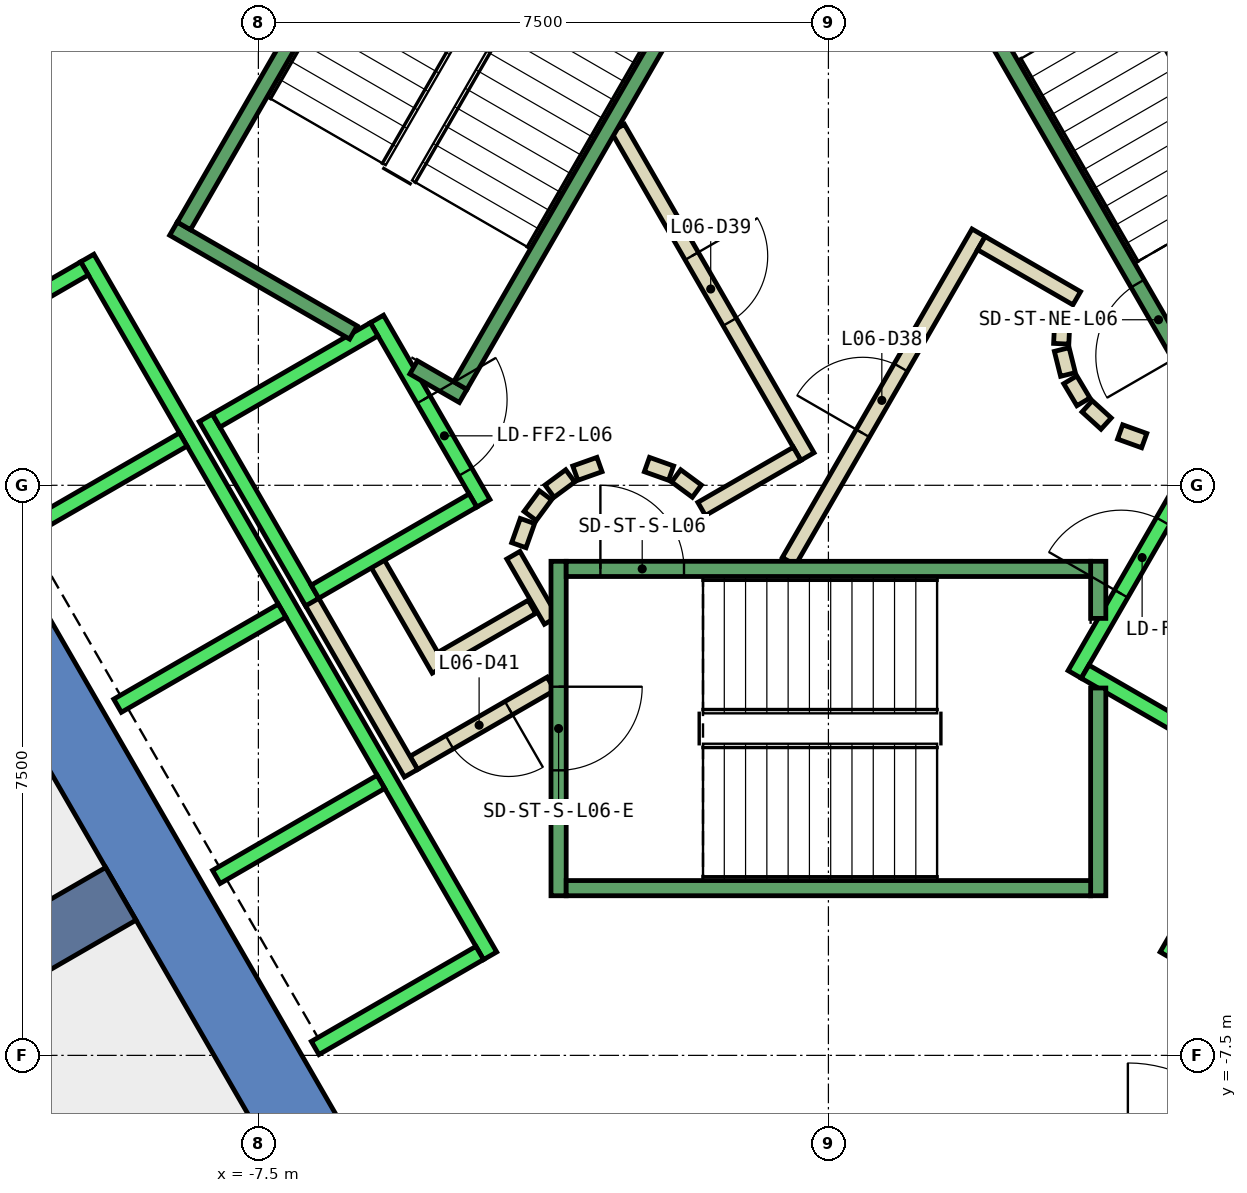
"""IFC4 building model, lengths in metres.
Left out: names, types, materials, properties, quantities, classifications, styles, units other than length and angle.
Written with IfcOpenShell. Run it as: python <this file> out.ifc"""

import sys

from ifc_helpers import new_model, si_unit, direction, frame, frame_2d, origin, place, context, subcontext, project, spatial, polyline, rectangle, outline, extrude, element, fill, save


model = new_model("IFC4")
c1 = context("Model", 3, precision=1e-05, world=origin(), true_north=direction((0.0, 1.0)))
c2 = subcontext(c1, "Body", "Model", "MODEL_VIEW")
j1 = project(units=[si_unit("LENGTHUNIT", "METRE"), si_unit("PLANEANGLEUNIT", "RADIAN")], contexts=[c1])
p1 = place(None, origin())
s1 = spatial("IfcSite", under=j1, at=p1, CompositionType="ELEMENT")
p2 = place(p1, origin())
s2 = spatial("IfcBuilding", under=s1, at=p2, CompositionType="ELEMENT")
p3 = place(p2, frame((0.0, 0.0, 35.0)))
s3 = spatial("IfcBuildingStorey", under=s2, at=p3, CompositionType="ELEMENT", Elevation=35.0)
p4 = place(p3, frame((0.0, 0.0, -0.6)))
e1 = element("IfcWall", 1, at=p4, inside=s3, PredefinedType="SHEAR", context=c2, shape_type="SweptSolid", body=[
    extrude(outline(polyline([(-12.267, 5.252), (-11.402, 4.752), (-6.351, 13.5), (-6.928, 14.5), (-12.267, 5.252)])), origin(), (0.0, 0.0, 1.0), 4.4),
])
p5 = place(p3, frame((0.0, 0.0, -0.6)))
e2 = element("IfcWall", 2, at=p5, inside=s3, PredefinedType="SHEAR", context=c2, shape_type="SweptSolid", body=[
    extrude(outline(polyline([(-13.856, 2.5), (-6.928, -9.5), (-6.351, -8.5), (-12.702, 2.5), (-13.856, 2.5)])), origin(), (0.0, 0.0, 1.0), 4.4),
])
p6 = place(p3, frame((-9.31, -5.375, -0.6), z_axis=(0.0, 0.0, 1.0), x_axis=(-0.866017533419, -0.500013631625, 0.0)))
e3 = element("IfcWall", 3, at=p6, inside=s3, PredefinedType="SHEAR", context=c2, shape_type="SweptSolid", body=[
    extrude(rectangle(XDim=9.0, YDim=0.8, at=frame_2d((4.5, 0.0))), origin(), (0.0, 0.0, 1.0), 4.4),
])
p7 = place(p3, frame((-3.9, -1.599, 0.0), z_axis=(0.0, 0.0, 1.0), x_axis=(-0.865969445389, -0.500096910261, 0.0)))
e4 = element("IfcWall", 4, at=p7, inside=s3, PredefinedType="PARTITIONING", context=c2, shape_type="SweptSolid", body=[
    extrude(rectangle(XDim=1.373, YDim=0.2, at=frame_2d((0.687, 0.0))), origin(), (0.0, 0.0, 1.0), 3.8),
])
p8 = place(p3, frame((-5.126, -2.422, 0.0), z_axis=(0.0, 0.0, 1.0), x_axis=(-0.500062241894, 0.865989465428, 0.0)))
e5 = element("IfcWall", 5, at=p8, inside=s3, PredefinedType="PARTITIONING", context=c2, shape_type="SweptSolid", body=[
    extrude(rectangle(XDim=1.7, YDim=0.2, at=frame_2d((0.85, 0.0))), origin(), (0.0, 0.0, 1.0), 3.8),
])
p9 = place(p3, frame((-3.65, -2.61, 0.0), z_axis=(0.0, 0.0, 1.0), x_axis=(-0.866072462134, -0.499918483688, 0.0)))
e6 = element("IfcWall", 6, at=p9, inside=s3, PredefinedType="PARTITIONING", context=c2, shape_type="SweptSolid", body=[
    extrude(rectangle(XDim=2.084, YDim=0.2, at=frame_2d((1.042, 0.0))), origin(), (0.0, 0.0, 1.0), 3.8),
])
p10 = place(p9, frame((0.642, 0.0, 0.0)))
e7 = element("IfcOpeningElement", 7, at=p10, cuts=e6, PredefinedType="OPENING", context=c2, shape_type="SweptSolid", body=[
    extrude(rectangle(XDim=0.9, YDim=2.1, at=frame_2d((0.45, 1.05))), frame((0.0, 0.11, 0.0), z_axis=(0.0, -1.0, 0.0), x_axis=(1.0, 0.0, 0.0)), (0.0, 0.0, 1.0), 0.22),
])
p11 = place(p3, frame((-5.492, -3.788, 0.0), z_axis=(0.0, 0.0, 1.0), x_axis=(-0.500008949224, 0.866020236886, 0.0)))
e8 = element("IfcWall", 8, at=p11, inside=s3, PredefinedType="PARTITIONING", context=c2, shape_type="SweptSolid", body=[
    extrude(rectangle(XDim=2.68, YDim=0.2, at=frame_2d((1.34, 0.0))), origin(), (0.0, 0.0, 1.0), 3.8),
])
p12 = place(p3, frame((-4.145, -0.92, 0.0), z_axis=(0.0, 0.0, 1.0), x_axis=(0.499743786207, -0.866173278362, 0.0)))
e9 = element("IfcWall", 9, at=p12, inside=s3, PredefinedType="PARTITIONING", context=c2, shape_type="SweptSolid", body=[
    extrude(rectangle(XDim=0.991, YDim=0.2, at=frame_2d((0.495, 0.0))), origin(), (0.0, 0.0, 1.0), 3.8),
])
p13 = place(p3, frame((-0.52, -1.0, 0.0), z_axis=(0.0, 0.0, 1.0), x_axis=(0.50011622646, 0.865958290007, 0.0)))
e10 = element("IfcWall", 10, at=p13, inside=s3, PredefinedType="PARTITIONING", context=c2, shape_type="SweptSolid", body=[
    extrude(rectangle(XDim=4.991, YDim=0.2, at=frame_2d((2.496, 0.0))), origin(), (0.0, 0.0, 1.0), 3.8),
])
p14 = place(p13, frame((1.945, 0.0, 0.0)))
e11 = element("IfcOpeningElement", 11, at=p14, cuts=e10, PredefinedType="OPENING", context=c2, shape_type="SweptSolid", body=[
    extrude(rectangle(XDim=1.0, YDim=2.1, at=frame_2d((0.5, 1.05))), frame((0.0, 0.11, 0.0), z_axis=(0.0, -1.0, 0.0), x_axis=(1.0, 0.0, 0.0)), (0.0, 0.0, 1.0), 0.22),
])
p15 = place(p3, frame((2.012, 3.186, 0.0), z_axis=(0.0, 0.0, 1.0), x_axis=(0.865891012941, -0.500232699559, 0.0)))
e12 = element("IfcWall", 12, at=p15, inside=s3, PredefinedType="PARTITIONING", context=c2, shape_type="SweptSolid", body=[
    extrude(rectangle(XDim=1.449, YDim=0.2, at=frame_2d((0.725, 0.0))), origin(), (0.0, 0.0, 1.0), 3.8),
])
p16 = place(p3, frame((3.079, 2.199, 0.0), z_axis=(0.0, 0.0, 1.0), x_axis=(-0.047771483479, -0.998858290933, 0.0)))
e13 = element("IfcWall", 13, at=p16, inside=s3, PredefinedType="PARTITIONING", context=c2, shape_type="SweptSolid", body=[
    extrude(rectangle(XDim=0.337, YDim=0.2, at=frame_2d((0.169, 0.0))), origin(), (0.0, 0.0, 1.0), 3.8),
])
p17 = place(p3, frame((3.07, 1.786, 0.0), z_axis=(0.0, 0.0, 1.0), x_axis=(0.242705583207, -0.970099994784, 0.0)))
e14 = element("IfcWall", 14, at=p17, inside=s3, PredefinedType="PARTITIONING", context=c2, shape_type="SweptSolid", body=[
    extrude(rectangle(XDim=0.338, YDim=0.2, at=frame_2d((0.169, 0.0))), origin(), (0.0, 0.0, 1.0), 3.8),
])
for number, where, z_axis, x_axis in (
    (15, (3.182, 1.388, 0.0), (0.0, 0.0, 1.0), (0.512, -0.859, 0.0)),
    (16, (3.404, 1.039, 0.0), (0.0, 0.0, 1.0), (0.74, -0.672, 0.0)),
):
    element("IfcWall", number, at=place(p3, frame(where, z_axis=z_axis, x_axis=x_axis)), inside=s3, PredefinedType="PARTITIONING", context=c2, shape_type="SweptSolid", body=[
        extrude(rectangle(XDim=0.338, YDim=0.2, at=frame_2d((0.169, 0.0))), origin(), (0.0, 0.0, 1.0), 3.8),
    ])
p18 = place(p3, frame((3.838, 0.702, 0.0), z_axis=(0.0, 0.0, 1.0), x_axis=(0.941035081519, -0.338308993895, 0.0)))
e17 = element("IfcWall", 17, at=p18, inside=s3, PredefinedType="PARTITIONING", context=c2, shape_type="SweptSolid", body=[
    extrude(rectangle(XDim=0.337, YDim=0.2, at=frame_2d((0.168, 0.0))), origin(), (0.0, 0.0, 1.0), 3.8),
])
p19 = place(p3, frame((-2.771, 4.7, 0.0), z_axis=(0.0, 0.0, 1.0), x_axis=(0.499969479948, -0.866043023828, 0.0)))
e18 = element("IfcWall", 18, at=p19, inside=s3, PredefinedType="PARTITIONING", context=c2, shape_type="SweptSolid", body=[
    extrude(rectangle(XDim=4.99, YDim=0.2, at=frame_2d((2.495, 0.0))), origin(), (0.0, 0.0, 1.0), 3.8),
])
p20 = place(p19, frame((1.945, 0.0, 0.0)))
e19 = element("IfcOpeningElement", 19, at=p20, cuts=e18, PredefinedType="OPENING", context=c2, shape_type="SweptSolid", body=[
    extrude(rectangle(XDim=1.0, YDim=2.1, at=frame_2d((0.5, 1.05))), frame((0.0, 0.11, 0.0), z_axis=(0.0, -1.0, 0.0), x_axis=(1.0, 0.0, 0.0)), (0.0, 0.0, 1.0), 0.22),
])
p21 = place(p3, frame((-0.412, 0.414, 0.0), z_axis=(0.0, 0.0, 1.0), x_axis=(-0.866017369001, -0.500013916395, 0.0)))
e20 = element("IfcWall", 20, at=p21, inside=s3, PredefinedType="PARTITIONING", context=c2, shape_type="SweptSolid", body=[
    extrude(rectangle(XDim=1.45, YDim=0.2, at=frame_2d((0.725, 0.0))), origin(), (0.0, 0.0, 1.0), 3.8),
])
p22 = place(p3, frame((-1.731, -0.077, 0.0), z_axis=(0.0, 0.0, 1.0), x_axis=(-0.804311165252, 0.594208338422, 0.0)))
e21 = element("IfcWall", 21, at=p22, inside=s3, PredefinedType="PARTITIONING", context=c2, shape_type="SweptSolid", body=[
    extrude(rectangle(XDim=0.338, YDim=0.2, at=frame_2d((0.169, 0.0))), origin(), (0.0, 0.0, 1.0), 3.8),
])
p23 = place(p3, frame((-2.07, 0.16, 0.0), z_axis=(0.0, 0.0, 1.0), x_axis=(-0.942199461132, 0.335052496547, 0.0)))
e22 = element("IfcWall", 22, at=p23, inside=s3, PredefinedType="PARTITIONING", context=c2, shape_type="SweptSolid", body=[
    extrude(rectangle(XDim=0.337, YDim=0.2, at=frame_2d((0.169, 0.0))), origin(), (0.0, 0.0, 1.0), 3.8),
])
p24 = place(p3, frame((-3.012, 0.273, 0.0), z_axis=(0.0, 0.0, 1.0), x_axis=(-0.942280615813, -0.334824194261, 0.0)))
e23 = element("IfcWall", 23, at=p24, inside=s3, PredefinedType="PARTITIONING", context=c2, shape_type="SweptSolid", body=[
    extrude(rectangle(XDim=0.338, YDim=0.2, at=frame_2d((0.169, 0.0))), origin(), (0.0, 0.0, 1.0), 3.8),
])
p25 = place(p3, frame((-3.397, 0.124, 0.0), z_axis=(0.0, 0.0, 1.0), x_axis=(-0.804311165252, -0.594208338422, 0.0)))
e24 = element("IfcWall", 24, at=p25, inside=s3, PredefinedType="PARTITIONING", context=c2, shape_type="SweptSolid", body=[
    extrude(rectangle(XDim=0.338, YDim=0.2, at=frame_2d((0.169, 0.0))), origin(), (0.0, 0.0, 1.0), 3.8),
])
p26 = place(p3, frame((-3.723, -0.131, 0.0), z_axis=(0.0, 0.0, 1.0), x_axis=(-0.594675113454, -0.803966112121, 0.0)))
e25 = element("IfcWall", 25, at=p26, inside=s3, PredefinedType="PARTITIONING", context=c2, shape_type="SweptSolid", body=[
    extrude(rectangle(XDim=0.338, YDim=0.2, at=frame_2d((0.169, 0.0))), origin(), (0.0, 0.0, 1.0), 3.8),
])
p27 = place(p3, frame((-3.96, -0.47, 0.0), z_axis=(0.0, 0.0, 1.0), x_axis=(-0.334824194261, -0.942280615813, 0.0)))
e26 = element("IfcWall", 26, at=p27, inside=s3, PredefinedType="PARTITIONING", context=c2, shape_type="SweptSolid", body=[
    extrude(rectangle(XDim=0.338, YDim=0.2, at=frame_2d((0.169, 0.0))), origin(), (0.0, 0.0, 1.0), 3.8),
])
p28 = place(p3, frame((-5.94, 2.188, 0.0), z_axis=(0.0, 0.0, 1.0), x_axis=(0.49994636267, -0.866056369097, 0.0)))
e27 = element("IfcWall", 27, at=p28, inside=s3, PredefinedType="STANDARD", context=c2, shape_type="SweptSolid", body=[
    extrude(rectangle(XDim=2.8, YDim=0.2, at=frame_2d((1.4, 0.0))), origin(), (0.0, 0.0, 1.0), 3.8),
])
p29 = place(p28, frame((1.225, 0.0, 0.0)))
e28 = element("IfcOpeningElement", 28, at=p29, cuts=e27, PredefinedType="OPENING", context=c2, shape_type="SweptSolid", body=[
    extrude(rectangle(XDim=1.1, YDim=2.1, at=frame_2d((0.55, 1.05))), frame((0.0, 0.11, 0.0), z_axis=(0.0, -1.0, 0.0), x_axis=(1.0, 0.0, 0.0)), (0.0, 0.0, 1.0), 0.22),
])
p30 = place(p3, frame((-8.192, 0.888, 0.0), z_axis=(0.0, 0.0, 1.0), x_axis=(0.49994636267, -0.866056369097, 0.0)))
e29 = element("IfcWall", 29, at=p30, inside=s3, PredefinedType="STANDARD", context=c2, shape_type="SweptSolid", body=[
    extrude(rectangle(XDim=2.8, YDim=0.2, at=frame_2d((1.4, 0.0))), origin(), (0.0, 0.0, 1.0), 3.8),
])
for number, where, z_axis, x_axis in (
    (30, (-5.977, 2.052, 0.0), (0.0, 0.0, 1.0), (-0.866, -0.5, 0.0)),
    (31, (-4.677, -0.2, 0.0), (0.0, 0.0, 1.0), (-0.866, -0.5, 0.0)),
):
    element("IfcWall", number, at=place(p3, frame(where, z_axis=z_axis, x_axis=x_axis)), inside=s3, PredefinedType="STANDARD", context=c2, shape_type="SweptSolid", body=[
        extrude(rectangle(XDim=2.399, YDim=0.2, at=frame_2d((1.2, 0.0))), origin(), (0.0, 0.0, 1.0), 3.8),
    ])
p31 = place(p3, frame((-9.751, 2.99, 0.0), z_axis=(0.0, 0.0, 1.0), x_axis=(0.50000090737, -0.866024879913, 0.0)))
e32 = element("IfcWall", 32, at=p31, inside=s3, PredefinedType="STANDARD", context=c2, shape_type="SweptSolid", body=[
    extrude(rectangle(XDim=10.6, YDim=0.2, at=frame_2d((5.3, 0.0))), origin(), (0.0, 0.0, 1.0), 3.8),
])
p32 = place(p3, frame((-9.788, 2.853, 0.0), z_axis=(0.0, 0.0, 1.0), x_axis=(-0.865998541277, -0.500046524342, 0.0)))
e33 = element("IfcWall", 33, at=p32, inside=s3, PredefinedType="STANDARD", context=c2, shape_type="SweptSolid", body=[
    extrude(rectangle(XDim=2.5, YDim=0.2, at=frame_2d((1.25, 0.0))), origin(), (0.0, 0.0, 1.0), 3.8),
])
for number, where, z_axis, x_axis in (
    (34, (-8.488, 0.602, 0.0), (0.0, 0.0, 1.0), (-0.866, -0.5, 0.0)),
    (35, (-7.188, -1.65, 0.0), (0.0, 0.0, 1.0), (-0.866, -0.5, 0.0)),
    (36, (-5.888, -3.902, 0.0), (0.0, 0.0, 1.0), (-0.866, -0.5, 0.0)),
    (37, (-4.588, -6.153, 0.0), (0.0, 0.0, 1.0), (-0.866, -0.5, 0.0)),
):
    element("IfcWall", number, at=place(p3, frame(where, z_axis=z_axis, x_axis=x_axis)), inside=s3, PredefinedType="STANDARD", context=c2, shape_type="SweptSolid", body=[
        extrude(rectangle(XDim=2.5, YDim=0.2, at=frame_2d((1.25, 0.0))), origin(), (0.0, 0.0, 1.0), 3.8),
    ])
p33 = place(p3, frame((3.24, -2.488, 0.0), z_axis=(0.0, 0.0, 1.0), x_axis=(0.49994636267, 0.866056369097, 0.0)))
e38 = element("IfcWall", 38, at=p33, inside=s3, PredefinedType="STANDARD", context=c2, shape_type="SweptSolid", body=[
    extrude(rectangle(XDim=2.8, YDim=0.2, at=frame_2d((1.4, 0.0))), origin(), (0.0, 0.0, 1.0), 3.8),
])
p34 = place(p33, frame((1.225, 0.0, 0.0)))
e39 = element("IfcOpeningElement", 39, at=p34, cuts=e38, PredefinedType="OPENING", context=c2, shape_type="SweptSolid", body=[
    extrude(rectangle(XDim=1.1, YDim=2.1, at=frame_2d((0.55, 1.05))), frame((0.0, 0.11, 0.0), z_axis=(0.0, -1.0, 0.0), x_axis=(1.0, 0.0, 0.0)), (0.0, 0.0, 1.0), 0.22),
])
p35 = place(p3, frame((3.377, -2.452, 0.0), z_axis=(0.0, 0.0, 1.0), x_axis=(0.865955154139, -0.50012165622, 0.0)))
e40 = element("IfcWall", 40, at=p35, inside=s3, PredefinedType="STANDARD", context=c2, shape_type="SweptSolid", body=[
    extrude(rectangle(XDim=2.4, YDim=0.2, at=frame_2d((1.2, 0.0))), origin(), (0.0, 0.0, 1.0), 3.8),
])
p36 = place(p3, frame((4.451, -6.19, 0.0), z_axis=(0.0, 0.0, 1.0), x_axis=(0.50000090737, 0.866024879913, 0.0)))
e41 = element("IfcWall", 41, at=p36, inside=s3, PredefinedType="STANDARD", context=c2, shape_type="SweptSolid", body=[
    extrude(rectangle(XDim=10.6, YDim=0.2, at=frame_2d((5.3, 0.0))), origin(), (0.0, 0.0, 1.0), 3.8),
])
p37 = place(p3, frame((-3.55, -1.0, 0.0), z_axis=(0.0, 0.0, 1.0), x_axis=(0.0, -1.0, 0.0)))
e42 = element("IfcWall", 42, at=p37, inside=s3, PredefinedType="STANDARD", context=c2, shape_type="SweptSolid", body=[
    extrude(rectangle(XDim=4.4, YDim=0.2, at=frame_2d((2.2, 0.0))), origin(), (0.0, 0.0, 1.0), 3.8),
])
p38 = place(p37, frame((1.65, 0.0, 0.0)))
e43 = element("IfcOpeningElement", 43, at=p38, cuts=e42, PredefinedType="OPENING", context=c2, shape_type="SweptSolid", body=[
    extrude(rectangle(XDim=1.1, YDim=2.2, at=frame_2d((0.55, 1.1))), frame((0.0, 0.11, 0.0), z_axis=(0.0, -1.0, 0.0), x_axis=(1.0, 0.0, 0.0)), (0.0, 0.0, 1.0), 0.22),
])
p39 = place(p3, frame((3.55, -2.667, 0.0), z_axis=(0.0, 0.0, 1.0), x_axis=(0.0, -1.0, 0.0)))
e44 = element("IfcWall", 44, at=p39, inside=s3, PredefinedType="STANDARD", context=c2, shape_type="SweptSolid", body=[
    extrude(rectangle(XDim=2.733, YDim=0.2, at=frame_2d((1.366, 0.0))), origin(), (0.0, 0.0, 1.0), 3.8),
])
p40 = place(p3, frame((3.55, -1.0, 0.0), z_axis=(0.0, 0.0, 1.0), x_axis=(0.0, -1.0, 0.0)))
e45 = element("IfcWall", 45, at=p40, inside=s3, PredefinedType="STANDARD", context=c2, shape_type="SweptSolid", body=[
    extrude(rectangle(XDim=0.751, YDim=0.2, at=frame_2d((0.375, 0.0))), origin(), (0.0, 0.0, 1.0), 3.8),
])
p41 = place(p3, frame((-3.45, -1.1, 0.0), z_axis=(0.0, 0.0, 1.0), x_axis=(1.0, 0.0, 0.0)))
e46 = element("IfcWall", 46, at=p41, inside=s3, PredefinedType="STANDARD", context=c2, shape_type="SweptSolid", body=[
    extrude(rectangle(XDim=6.9, YDim=0.2, at=frame_2d((3.45, 0.0))), origin(), (0.0, 0.0, 1.0), 3.8),
])
p42 = place(p41, frame((0.45, 0.0, 0.0)))
e47 = element("IfcOpeningElement", 47, at=p42, cuts=e46, PredefinedType="OPENING", context=c2, shape_type="SweptSolid", body=[
    extrude(rectangle(XDim=1.1, YDim=2.2, at=frame_2d((0.55, 1.1))), frame((0.0, 0.11, 0.0), z_axis=(0.0, -1.0, 0.0), x_axis=(1.0, 0.0, 0.0)), (0.0, 0.0, 1.0), 0.22),
])
p43 = place(p3, frame((-3.45, -5.3, 0.0), z_axis=(0.0, 0.0, 1.0), x_axis=(1.0, 0.0, 0.0)))
e48 = element("IfcWall", 48, at=p43, inside=s3, PredefinedType="STANDARD", context=c2, shape_type="SweptSolid", body=[
    extrude(rectangle(XDim=6.9, YDim=0.2, at=frame_2d((3.45, 0.0))), origin(), (0.0, 0.0, 1.0), 3.8),
])
p44 = place(p3, frame((4.843, 1.312, 0.0), z_axis=(0.0, 0.0, 1.0), x_axis=(-0.499963383562, 0.866046543262, 0.0)))
e49 = element("IfcWall", 49, at=p44, inside=s3, PredefinedType="STANDARD", context=c2, shape_type="SweptSolid", body=[
    extrude(rectangle(XDim=6.9, YDim=0.2, at=frame_2d((3.45, 0.0))), origin(), (0.0, 0.0, 1.0), 3.8),
])
p45 = place(p44, frame((0.45, 0.0, 0.0)))
e50 = element("IfcOpeningElement", 50, at=p45, cuts=e49, PredefinedType="OPENING", context=c2, shape_type="SweptSolid", body=[
    extrude(rectangle(XDim=1.1, YDim=2.2, at=frame_2d((0.55, 1.1))), frame((0.0, 0.11, 0.0), z_axis=(0.0, -1.0, 0.0), x_axis=(1.0, 0.0, 0.0)), (0.0, 0.0, 1.0), 0.22),
])
p46 = place(p3, frame((-6.25, 2.01, 0.0), z_axis=(0.0, 0.0, 1.0), x_axis=(-0.86611865017, 0.499838457731, 0.0)))
e51 = element("IfcWall", 51, at=p46, inside=s3, PredefinedType="STANDARD", context=c2, shape_type="SweptSolid", body=[
    extrude(rectangle(XDim=2.733, YDim=0.2, at=frame_2d((1.366, 0.0))), origin(), (0.0, 0.0, 1.0), 3.8),
])
p47 = place(p3, frame((-4.806, 1.176, 0.0), z_axis=(0.0, 0.0, 1.0), x_axis=(-0.866558586415, 0.499075361355, 0.0)))
e52 = element("IfcWall", 52, at=p47, inside=s3, PredefinedType="STANDARD", context=c2, shape_type="SweptSolid", body=[
    extrude(rectangle(XDim=0.751, YDim=0.2, at=frame_2d((0.376, 0.0))), origin(), (0.0, 0.0, 1.0), 3.8),
])
p48 = place(p3, frame((-1.393, 7.288, 0.0), z_axis=(0.0, 0.0, 1.0), x_axis=(-0.499963383562, -0.866046543262, 0.0)))
e53 = element("IfcWall", 53, at=p48, inside=s3, PredefinedType="STANDARD", context=c2, shape_type="SweptSolid", body=[
    extrude(rectangle(XDim=6.9, YDim=0.2, at=frame_2d((3.45, 0.0))), origin(), (0.0, 0.0, 1.0), 3.8),
])
p49 = place(p48, frame((0.45, 0.0, 0.0)))
e54 = element("IfcOpeningElement", 54, at=p49, cuts=e53, PredefinedType="OPENING", context=c2, shape_type="SweptSolid", body=[
    extrude(rectangle(XDim=1.1, YDim=2.2, at=frame_2d((0.55, 1.1))), frame((0.0, 0.11, 0.0), z_axis=(0.0, -1.0, 0.0), x_axis=(1.0, 0.0, 0.0)), (0.0, 0.0, 1.0), 0.22),
])
p50 = place(p3, frame((-5.03, 9.388, 0.0), z_axis=(0.0, 0.0, 1.0), x_axis=(-0.499978703459, -0.866037698999, 0.0)))
e55 = element("IfcWall", 55, at=p50, inside=s3, PredefinedType="STANDARD", context=c2, shape_type="SweptSolid", body=[
    extrude(rectangle(XDim=6.9, YDim=0.2, at=frame_2d((3.45, 0.0))), origin(), (0.0, 0.0, 1.0), 3.8),
])
p51 = place(p14, origin())
e56 = element("IfcDoor", 56, at=p51, inside=s3, OperationType="SINGLE_SWING_LEFT", PredefinedType="DOOR", context=c2, shape_type="SweptSolid", body=[
    extrude(rectangle(XDim=1.0, YDim=2.1, at=frame_2d((0.5, 1.05))), frame((0.0, 0.025, 0.0), z_axis=(0.0, -1.0, 0.0), x_axis=(1.0, 0.0, 0.0)), (0.0, 0.0, 1.0), 0.05),
])
fill(e11, e56)
p52 = place(p20, origin())
e57 = element("IfcDoor", 57, at=p52, inside=s3, OperationType="SINGLE_SWING_RIGHT", PredefinedType="DOOR", context=c2, shape_type="SweptSolid", body=[
    extrude(rectangle(XDim=1.0, YDim=2.1, at=frame_2d((0.5, 1.05))), frame((0.0, 0.025, 0.0), z_axis=(0.0, -1.0, 0.0), x_axis=(1.0, 0.0, 0.0)), (0.0, 0.0, 1.0), 0.05),
])
fill(e19, e57)
p53 = place(p10, origin())
e58 = element("IfcDoor", 58, at=p53, inside=s3, OperationType="SINGLE_SWING_LEFT", PredefinedType="DOOR", context=c2, shape_type="SweptSolid", body=[
    extrude(rectangle(XDim=0.9, YDim=2.1, at=frame_2d((0.45, 1.05))), frame((0.0, 0.025, 0.0), z_axis=(0.0, -1.0, 0.0), x_axis=(1.0, 0.0, 0.0)), (0.0, 0.0, 1.0), 0.05),
])
fill(e7, e58)
p54 = place(p34, origin())
e59 = element("IfcDoor", 59, at=p54, inside=s3, OperationType="SLIDING_TO_LEFT", PredefinedType="DOOR", context=c2, shape_type="SweptSolid", body=[
    extrude(rectangle(XDim=1.1, YDim=2.1, at=frame_2d((0.55, 1.05))), frame((0.0, 0.025, 0.0), z_axis=(0.0, -1.0, 0.0), x_axis=(1.0, 0.0, 0.0)), (0.0, 0.0, 1.0), 0.05),
])
fill(e39, e59)
p55 = place(p29, origin())
e60 = element("IfcDoor", 60, at=p55, inside=s3, OperationType="SLIDING_TO_LEFT", PredefinedType="DOOR", context=c2, shape_type="SweptSolid", body=[
    extrude(rectangle(XDim=1.1, YDim=2.1, at=frame_2d((0.55, 1.05))), frame((0.0, 0.025, 0.0), z_axis=(0.0, -1.0, 0.0), x_axis=(1.0, 0.0, 0.0)), (0.0, 0.0, 1.0), 0.05),
])
fill(e28, e60)
p56 = place(p42, origin())
e61 = element("IfcDoor", 61, at=p56, inside=s3, OperationType="SINGLE_SWING_LEFT", PredefinedType="DOOR", context=c2, shape_type="SweptSolid", body=[
    extrude(rectangle(XDim=1.1, YDim=2.2, at=frame_2d((0.55, 1.1))), frame((0.0, 0.025, 0.0), z_axis=(0.0, -1.0, 0.0), x_axis=(1.0, 0.0, 0.0)), (0.0, 0.0, 1.0), 0.05),
])
fill(e47, e61)
p57 = place(p38, origin())
e62 = element("IfcDoor", 62, at=p57, inside=s3, OperationType="SINGLE_SWING_LEFT", PredefinedType="DOOR", context=c2, shape_type="SweptSolid", body=[
    extrude(rectangle(XDim=1.1, YDim=2.2, at=frame_2d((0.55, 1.1))), frame((0.0, 0.025, 0.0), z_axis=(0.0, -1.0, 0.0), x_axis=(1.0, 0.0, 0.0)), (0.0, 0.0, 1.0), 0.05),
])
fill(e43, e62)
p58 = place(p45, origin())
e63 = element("IfcDoor", 63, at=p58, inside=s3, OperationType="SINGLE_SWING_LEFT", PredefinedType="DOOR", context=c2, shape_type="SweptSolid", body=[
    extrude(rectangle(XDim=1.1, YDim=2.2, at=frame_2d((0.55, 1.1))), frame((0.0, 0.025, 0.0), z_axis=(0.0, -1.0, 0.0), x_axis=(1.0, 0.0, 0.0)), (0.0, 0.0, 1.0), 0.05),
])
fill(e50, e63)
save(model, sys.argv[1])
